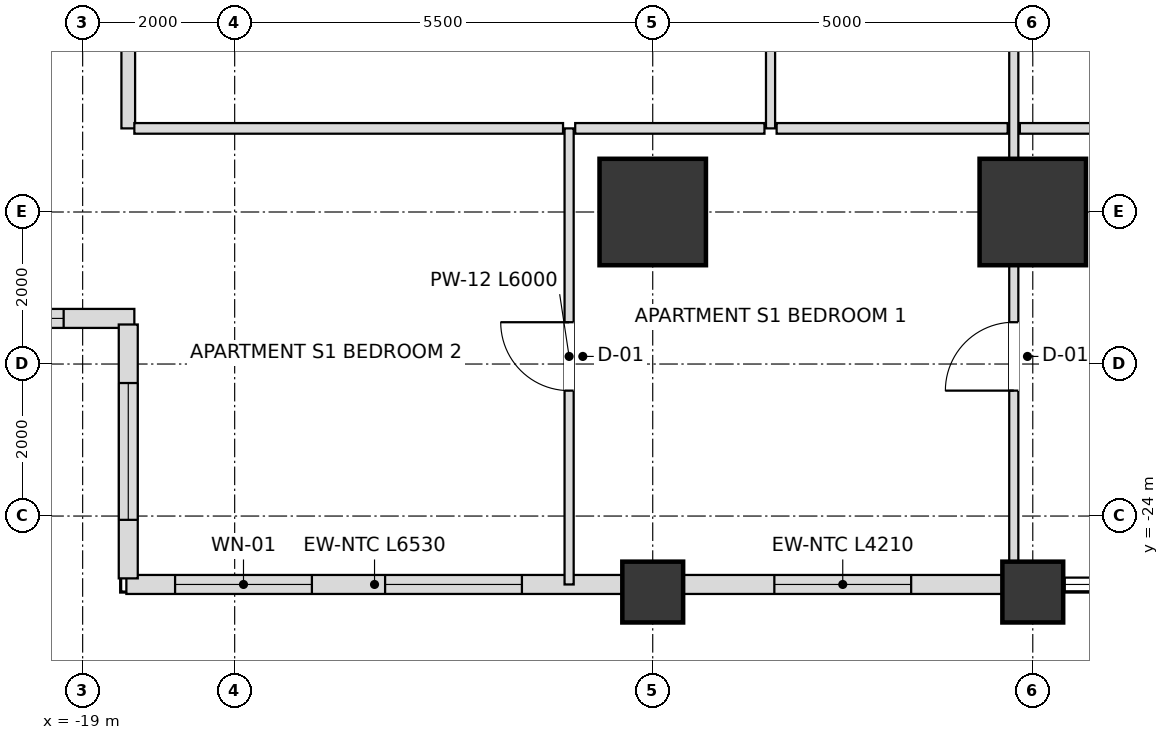
"""IFC4 building model, lengths in metres.
Left out: names, types, materials, properties, quantities, classifications, styles, units other than length and angle.
Written with IfcOpenShell. Run it as: python <this file> out.ifc"""

import sys

from ifc_helpers import new_model, si_unit, direction, frame, frame_2d, origin, origin_2d, place, context, subcontext, project, spatial, rectangle, extrude, element, fill, save


model = new_model("IFC4")
c1 = context("Model", 3, precision=1e-05, world=origin(), true_north=direction((0.0, 1.0)))
c2 = subcontext(c1, "Body", "Model", "MODEL_VIEW")
j1 = project(units=[si_unit("LENGTHUNIT", "METRE"), si_unit("PLANEANGLEUNIT", "RADIAN")], contexts=[c1])
p1 = place(None, origin())
s1 = spatial("IfcSite", under=j1, at=p1, CompositionType="ELEMENT")
p2 = place(p1, origin())
s2 = spatial("IfcBuilding", under=s1, at=p2, CompositionType="ELEMENT")
p3 = place(p2, frame((0.0, 0.0, 75.6)))
s3 = spatial("IfcBuildingStorey", under=s2, at=p3, CompositionType="ELEMENT", Elevation=75.6)
for number, where, z_axis, x_axis in (
    (1, (-11.5, -20.0, 0.0), (0.0, 0.0, 1.0), (1.0, 0.0, 0.0)),
    (2, (-6.5, -20.0, 0.0), (0.0, 0.0, 1.0), (1.0, 0.0, 0.0)),
):
    element("IfcColumn", number, at=place(p3, frame(where, z_axis=z_axis, x_axis=x_axis)), inside=s3, PredefinedType="USERDEFINED", context=c2, shape_type="SweptSolid", body=[
        extrude(rectangle(XDim=1.4, YDim=1.4, at=origin_2d()), origin(), (0.0, 0.0, 1.0), 3.6),
    ])
for number, where, z_axis, x_axis in (
    (3, (-11.5, -25.0, 0.0), (0.0, 0.0, 1.0), (1.0, 0.0, 0.0)),
    (4, (-6.5, -25.0, 0.0), (0.0, 0.0, 1.0), (1.0, 0.0, 0.0)),
):
    element("IfcColumn", number, at=place(p3, frame(where, z_axis=z_axis, x_axis=x_axis)), inside=s3, PredefinedType="COLUMN", context=c2, shape_type="SweptSolid", body=[
        extrude(rectangle(XDim=0.8, YDim=0.8, at=origin_2d()), origin(), (0.0, 0.0, 1.0), 3.6),
    ])
p4 = place(p3, frame((-18.425, -24.9, 0.0), z_axis=(0.0, 0.0, 1.0), x_axis=(1.0, 0.0, 0.0)))
e5 = element("IfcWall", 5, at=p4, inside=s3, PredefinedType="SOLIDWALL", context=c2, shape_type="SweptSolid", body=[
    extrude(rectangle(XDim=6.53, YDim=0.25, at=frame_2d((3.265, 0.0))), origin(), (0.0, 0.0, 1.0), 2.736),
])
p5 = place(p4, frame((0.641, 0.0, 0.72)))
e6 = element("IfcOpeningElement", 6, at=p5, cuts=e5, PredefinedType="OPENING", context=c2, shape_type="SweptSolid", body=[
    extrude(rectangle(XDim=1.8, YDim=1.68, at=frame_2d((0.9, 0.84))), frame((0.0, 0.135, 0.0), z_axis=(0.0, -1.0, 0.0), x_axis=(1.0, 0.0, 0.0)), (0.0, 0.0, 1.0), 0.27),
])
p6 = place(p4, frame((3.404, 0.0, 0.72)))
e7 = element("IfcOpeningElement", 7, at=p6, cuts=e5, PredefinedType="OPENING", context=c2, shape_type="SweptSolid", body=[
    extrude(rectangle(XDim=1.8, YDim=1.68, at=frame_2d((0.9, 0.84))), frame((0.0, 0.135, 0.0), z_axis=(0.0, -1.0, 0.0), x_axis=(1.0, 0.0, 0.0)), (0.0, 0.0, 1.0), 0.27),
])
p7 = place(p3, frame((-11.105, -24.9, 0.0), z_axis=(0.0, 0.0, 1.0), x_axis=(1.0, 0.0, 0.0)))
e8 = element("IfcWall", 8, at=p7, inside=s3, PredefinedType="SOLIDWALL", context=c2, shape_type="SweptSolid", body=[
    extrude(rectangle(XDim=4.21, YDim=0.25, at=frame_2d((2.105, 0.0))), origin(), (0.0, 0.0, 1.0), 2.736),
])
p8 = place(p7, frame((1.205, 0.0, 0.72)))
e9 = element("IfcOpeningElement", 9, at=p8, cuts=e8, PredefinedType="OPENING", context=c2, shape_type="SweptSolid", body=[
    extrude(rectangle(XDim=1.8, YDim=1.68, at=frame_2d((0.9, 0.84))), frame((0.0, 0.135, 0.0), z_axis=(0.0, -1.0, 0.0), x_axis=(1.0, 0.0, 0.0)), (0.0, 0.0, 1.0), 0.27),
])
p9 = place(p3, frame((-21.98, -21.4, 0.0), z_axis=(0.0, 0.0, 1.0), x_axis=(1.0, 0.0, 0.0)))
e10 = element("IfcWall", 10, at=p9, inside=s3, PredefinedType="SOLIDWALL", context=c2, shape_type="SweptSolid", body=[
    extrude(rectangle(XDim=3.66, YDim=0.25, at=frame_2d((1.83, 0.0))), origin(), (0.0, 0.0, 1.0), 2.736),
])
p10 = place(p9, frame((0.93, 0.0, 0.72)))
e11 = element("IfcOpeningElement", 11, at=p10, cuts=e10, PredefinedType="OPENING", context=c2, shape_type="SweptSolid", body=[
    extrude(rectangle(XDim=1.8, YDim=1.68, at=frame_2d((0.9, 0.84))), frame((0.0, 0.135, 0.0), z_axis=(0.0, -1.0, 0.0), x_axis=(1.0, 0.0, 0.0)), (0.0, 0.0, 1.0), 0.27),
])
p11 = place(p3, frame((-18.4, -21.48, 0.0), z_axis=(0.0, 0.0, 1.0), x_axis=(0.0, -1.0, 0.0)))
e12 = element("IfcWall", 12, at=p11, inside=s3, PredefinedType="SOLIDWALL", context=c2, shape_type="SweptSolid", body=[
    extrude(rectangle(XDim=3.34, YDim=0.25, at=frame_2d((1.67, 0.0))), origin(), (0.0, 0.0, 1.0), 2.736),
])
p12 = place(p11, frame((0.77, 0.0, 0.72)))
e13 = element("IfcOpeningElement", 13, at=p12, cuts=e12, PredefinedType="OPENING", context=c2, shape_type="SweptSolid", body=[
    extrude(rectangle(XDim=1.8, YDim=1.68, at=frame_2d((0.9, 0.84))), frame((0.0, 0.135, 0.0), z_axis=(0.0, -1.0, 0.0), x_axis=(1.0, 0.0, 0.0)), (0.0, 0.0, 1.0), 0.27),
])
p13 = place(p3, frame((-18.4, -18.9, 0.0), z_axis=(0.0, 0.0, 1.0), x_axis=(0.0, 1.0, 0.0)))
e14 = element("IfcWall", 14, at=p13, inside=s3, PredefinedType="PARTITIONING", context=c2, shape_type="SweptSolid", body=[
    extrude(rectangle(XDim=9.6, YDim=0.18, at=frame_2d((4.8, 0.0))), origin(), (0.0, 0.0, 1.0), 2.736),
])
p14 = place(p3, frame((-12.6, -24.9, 0.0), z_axis=(0.0, 0.0, 1.0), x_axis=(0.0, 1.0, 0.0)))
e15 = element("IfcWall", 15, at=p14, inside=s3, PredefinedType="PARTITIONING", context=c2, shape_type="SweptSolid", body=[
    extrude(rectangle(XDim=6.0, YDim=0.12, at=frame_2d((3.0, 0.0))), origin(), (0.0, 0.0, 1.0), 2.736),
])
p15 = place(p14, frame((2.55, 0.0, 0.0)))
e16 = element("IfcOpeningElement", 16, at=p15, cuts=e15, PredefinedType="OPENING", context=c2, shape_type="SweptSolid", body=[
    extrude(rectangle(XDim=0.9, YDim=2.1, at=frame_2d((0.45, 1.05))), frame((0.0, 0.07, 0.0), z_axis=(0.0, -1.0, 0.0), x_axis=(1.0, 0.0, 0.0)), (0.0, 0.0, 1.0), 0.14),
])
p16 = place(p3, frame((-9.95, -18.9, 0.0), z_axis=(0.0, 0.0, 1.0), x_axis=(0.0, 1.0, 0.0)))
e17 = element("IfcWall", 17, at=p16, inside=s3, PredefinedType="PARTITIONING", context=c2, shape_type="SweptSolid", body=[
    extrude(rectangle(XDim=9.6, YDim=0.12, at=frame_2d((4.8, 0.0))), origin(), (0.0, 0.0, 1.0), 2.816),
])
p17 = place(p16, frame((4.35, 0.0, 0.0)))
e18 = element("IfcOpeningElement", 18, at=p17, cuts=e17, PredefinedType="OPENING", context=c2, shape_type="SweptSolid", body=[
    extrude(rectangle(XDim=0.9, YDim=2.1, at=frame_2d((0.45, 1.05))), frame((0.0, 0.07, 0.0), z_axis=(0.0, -1.0, 0.0), x_axis=(1.0, 0.0, 0.0)), (0.0, 0.0, 1.0), 0.14),
])
p18 = place(p3, frame((-6.75, -24.9, 0.0), z_axis=(0.0, 0.0, 1.0), x_axis=(0.0, 1.0, 0.0)))
e19 = element("IfcWall", 19, at=p18, inside=s3, PredefinedType="PARTITIONING", context=c2, shape_type="SweptSolid", body=[
    extrude(rectangle(XDim=15.6, YDim=0.12, at=frame_2d((7.8, 0.0))), origin(), (0.0, 0.0, 1.0), 2.816),
])
p19 = place(p18, frame((10.325, 0.0, 0.0)))
e20 = element("IfcOpeningElement", 20, at=p19, cuts=e19, PredefinedType="OPENING", context=c2, shape_type="SweptSolid", body=[
    extrude(rectangle(XDim=0.95, YDim=2.1, at=frame_2d((0.475, 1.05))), frame((0.0, 0.07, 0.0), z_axis=(0.0, -1.0, 0.0), x_axis=(1.0, 0.0, 0.0)), (0.0, 0.0, 1.0), 0.14),
])
p20 = place(p18, frame((2.55, 0.0, 0.0)))
e21 = element("IfcOpeningElement", 21, at=p20, cuts=e19, PredefinedType="OPENING", context=c2, shape_type="SweptSolid", body=[
    extrude(rectangle(XDim=0.9, YDim=2.1, at=frame_2d((0.45, 1.05))), frame((0.0, 0.07, 0.0), z_axis=(0.0, -1.0, 0.0), x_axis=(1.0, 0.0, 0.0)), (0.0, 0.0, 1.0), 0.14),
])
p21 = place(p3, frame((-18.32, -18.9, 0.0), z_axis=(0.0, 0.0, 1.0), x_axis=(1.0, 0.0, 0.0)))
e22 = element("IfcWall", 22, at=p21, inside=s3, PredefinedType="PARTITIONING", context=c2, shape_type="SweptSolid", body=[
    extrude(rectangle(XDim=5.64, YDim=0.14, at=frame_2d((2.82, 0.0))), origin(), (0.0, 0.0, 1.0), 2.736),
])
p22 = place(p3, frame((-12.52, -18.9, 0.0), z_axis=(0.0, 0.0, 1.0), x_axis=(1.0, 0.0, 0.0)))
e23 = element("IfcWall", 23, at=p22, inside=s3, PredefinedType="PARTITIONING", context=c2, shape_type="SweptSolid", body=[
    extrude(rectangle(XDim=2.49, YDim=0.14, at=frame_2d((1.245, 0.0))), origin(), (0.0, 0.0, 1.0), 2.736),
])
p23 = place(p3, frame((-9.87, -18.9, 0.0), z_axis=(0.0, 0.0, 1.0), x_axis=(1.0, 0.0, 0.0)))
e24 = element("IfcWall", 24, at=p23, inside=s3, PredefinedType="PARTITIONING", context=c2, shape_type="SweptSolid", body=[
    extrude(rectangle(XDim=3.04, YDim=0.14, at=frame_2d((1.52, 0.0))), origin(), (0.0, 0.0, 1.0), 3.38),
])
p24 = place(p3, frame((-6.67, -18.9, 0.0), z_axis=(0.0, 0.0, 1.0), x_axis=(1.0, 0.0, 0.0)))
e25 = element("IfcWall", 25, at=p24, inside=s3, PredefinedType="PARTITIONING", context=c2, shape_type="SweptSolid", body=[
    extrude(rectangle(XDim=4.04, YDim=0.14, at=frame_2d((2.02, 0.0))), origin(), (0.0, 0.0, 1.0), 2.816),
])
p25 = place(p24, frame((1.545, 0.0, 0.0)))
e26 = element("IfcOpeningElement", 26, at=p25, cuts=e25, PredefinedType="OPENING", context=c2, shape_type="SweptSolid", body=[
    extrude(rectangle(XDim=0.95, YDim=2.1, at=frame_2d((0.475, 1.05))), frame((0.0, 0.08, 0.0), z_axis=(0.0, -1.0, 0.0), x_axis=(1.0, 0.0, 0.0)), (0.0, 0.0, 1.0), 0.16),
])
p26 = place(p5, origin())
e27 = element("IfcWindow", 27, at=p26, inside=s3, PartitioningType="SINGLE_PANEL", PredefinedType="WINDOW", context=c2, shape_type="SweptSolid", body=[
    extrude(rectangle(XDim=1.8, YDim=1.68, at=frame_2d((0.9, 0.84))), frame((0.0, 0.03, 0.0), z_axis=(0.0, -1.0, 0.0), x_axis=(1.0, 0.0, 0.0)), (0.0, 0.0, 1.0), 0.06),
])
fill(e6, e27)
p27 = place(p6, origin())
e28 = element("IfcWindow", 28, at=p27, inside=s3, PartitioningType="SINGLE_PANEL", PredefinedType="WINDOW", context=c2, shape_type="SweptSolid", body=[
    extrude(rectangle(XDim=1.8, YDim=1.68, at=frame_2d((0.9, 0.84))), frame((0.0, 0.03, 0.0), z_axis=(0.0, -1.0, 0.0), x_axis=(1.0, 0.0, 0.0)), (0.0, 0.0, 1.0), 0.06),
])
fill(e7, e28)
p28 = place(p8, origin())
e29 = element("IfcWindow", 29, at=p28, inside=s3, PartitioningType="SINGLE_PANEL", PredefinedType="WINDOW", context=c2, shape_type="SweptSolid", body=[
    extrude(rectangle(XDim=1.8, YDim=1.68, at=frame_2d((0.9, 0.84))), frame((0.0, 0.03, 0.0), z_axis=(0.0, -1.0, 0.0), x_axis=(1.0, 0.0, 0.0)), (0.0, 0.0, 1.0), 0.06),
])
fill(e9, e29)
p29 = place(p10, origin())
e30 = element("IfcWindow", 30, at=p29, inside=s3, PartitioningType="SINGLE_PANEL", PredefinedType="WINDOW", context=c2, shape_type="SweptSolid", body=[
    extrude(rectangle(XDim=1.8, YDim=1.68, at=frame_2d((0.9, 0.84))), frame((0.0, 0.03, 0.0), z_axis=(0.0, -1.0, 0.0), x_axis=(1.0, 0.0, 0.0)), (0.0, 0.0, 1.0), 0.06),
])
fill(e11, e30)
p30 = place(p12, origin())
e31 = element("IfcWindow", 31, at=p30, inside=s3, PartitioningType="SINGLE_PANEL", PredefinedType="WINDOW", context=c2, shape_type="SweptSolid", body=[
    extrude(rectangle(XDim=1.8, YDim=1.68, at=frame_2d((0.9, 0.84))), frame((0.0, 0.03, 0.0), z_axis=(0.0, -1.0, 0.0), x_axis=(1.0, 0.0, 0.0)), (0.0, 0.0, 1.0), 0.06),
])
fill(e13, e31)
p31 = place(p20, origin())
e32 = element("IfcDoor", 32, at=p31, inside=s3, OperationType="SINGLE_SWING_LEFT", PredefinedType="DOOR", context=c2, shape_type="SweptSolid", body=[
    extrude(rectangle(XDim=0.9, YDim=2.1, at=frame_2d((0.45, 1.05))), frame((0.0, 0.025, 0.0), z_axis=(0.0, -1.0, 0.0), x_axis=(1.0, 0.0, 0.0)), (0.0, 0.0, 1.0), 0.05),
])
fill(e21, e32)
p32 = place(p15, origin())
e33 = element("IfcDoor", 33, at=p32, inside=s3, OperationType="SINGLE_SWING_RIGHT", PredefinedType="DOOR", context=c2, shape_type="SweptSolid", body=[
    extrude(rectangle(XDim=0.9, YDim=2.1, at=frame_2d((0.45, 1.05))), frame((0.0, 0.025, 0.0), z_axis=(0.0, -1.0, 0.0), x_axis=(1.0, 0.0, 0.0)), (0.0, 0.0, 1.0), 0.05),
])
fill(e16, e33)
save(model, sys.argv[1])
